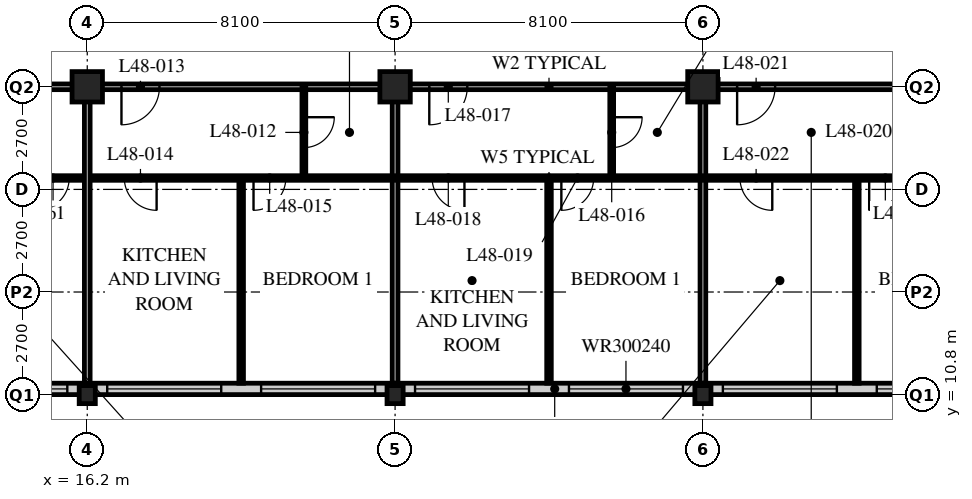
"""IFC4 building model, lengths in metres.
Left out: names, types, materials, properties, quantities, classifications, styles, units other than length and angle.
Written with IfcOpenShell. Run it as: python <this file> out.ifc"""

import sys

from ifc_helpers import new_model, si_unit, direction, frame, frame_2d, origin, origin_2d, place, context, subcontext, project, spatial, rectangle, hollow_rectangle, i_section, extrude, element, fill, save


model = new_model("IFC4")
c1 = context("Model", 3, precision=1e-05, world=origin(), true_north=direction((0.0, 1.0)))
c2 = subcontext(c1, "Body", "Model", "MODEL_VIEW")
j1 = project(units=[si_unit("LENGTHUNIT", "METRE"), si_unit("PLANEANGLEUNIT", "RADIAN")], contexts=[c1])
p1 = place(None, origin())
s1 = spatial("IfcSite", under=j1, at=p1, CompositionType="ELEMENT")
p2 = place(p1, origin())
s2 = spatial("IfcBuilding", under=s1, at=p2, CompositionType="ELEMENT")
p3 = place(p2, frame((0.0, 0.0, 188.4)))
s3 = spatial("IfcBuildingStorey", under=s2, at=p3, CompositionType="ELEMENT", Elevation=188.4)
p4 = place(p3, frame((16.2, 10.8, 0.0), z_axis=(0.0, 0.0, 1.0), x_axis=(1.0, 0.0, 0.0)))
e1 = element("IfcColumn", 1, at=p4, inside=s3, PredefinedType="COLUMN", context=c2, shape_type="SweptSolid", body=[
    extrude(i_section(OverallWidth=0.424, OverallDepth=0.475, WebThickness=0.048, FlangeThickness=0.077, FilletRadius=0.015, at=origin_2d()), origin(), (0.0, 0.0, 1.0), 3.6),
])
p5 = place(p3, frame((16.2, 18.9, 0.0), z_axis=(0.0, 0.0, 1.0), x_axis=(1.0, 0.0, 0.0)))
e2 = element("IfcColumn", 2, at=p5, inside=s3, PredefinedType="COLUMN", context=c2, shape_type="SweptSolid", body=[
    extrude(hollow_rectangle(XDim=0.8, YDim=0.8, WallThickness=0.08, at=origin_2d()), origin(), (0.0, 0.0, 1.0), 3.6),
])
p6 = place(p3, frame((24.3, 10.8, 0.0), z_axis=(0.0, 0.0, 1.0), x_axis=(1.0, 0.0, 0.0)))
e3 = element("IfcColumn", 3, at=p6, inside=s3, PredefinedType="COLUMN", context=c2, shape_type="SweptSolid", body=[
    extrude(i_section(OverallWidth=0.424, OverallDepth=0.475, WebThickness=0.048, FlangeThickness=0.077, FilletRadius=0.015, at=origin_2d()), origin(), (0.0, 0.0, 1.0), 3.6),
])
p7 = place(p3, frame((24.3, 18.9, 0.0), z_axis=(0.0, 0.0, 1.0), x_axis=(1.0, 0.0, 0.0)))
e4 = element("IfcColumn", 4, at=p7, inside=s3, PredefinedType="COLUMN", context=c2, shape_type="SweptSolid", body=[
    extrude(hollow_rectangle(XDim=0.8, YDim=0.8, WallThickness=0.08, at=origin_2d()), origin(), (0.0, 0.0, 1.0), 3.6),
])
p8 = place(p3, frame((32.4, 10.8, 0.0), z_axis=(0.0, 0.0, 1.0), x_axis=(1.0, 0.0, 0.0)))
e5 = element("IfcColumn", 5, at=p8, inside=s3, PredefinedType="COLUMN", context=c2, shape_type="SweptSolid", body=[
    extrude(i_section(OverallWidth=0.424, OverallDepth=0.475, WebThickness=0.048, FlangeThickness=0.077, FilletRadius=0.015, at=origin_2d()), origin(), (0.0, 0.0, 1.0), 3.6),
])
p9 = place(p3, frame((32.4, 18.9, 0.0), z_axis=(0.0, 0.0, 1.0), x_axis=(1.0, 0.0, 0.0)))
e6 = element("IfcColumn", 6, at=p9, inside=s3, PredefinedType="COLUMN", context=c2, shape_type="SweptSolid", body=[
    extrude(hollow_rectangle(XDim=0.8, YDim=0.8, WallThickness=0.08, at=origin_2d()), origin(), (0.0, 0.0, 1.0), 3.6),
])
p10 = place(p3, frame((8.4, 10.95, 0.0), z_axis=(0.0, 0.0, 1.0), x_axis=(1.0, 0.0, 0.0)))
e7 = element("IfcWall", 7, at=p10, inside=s3, PredefinedType="SOLIDWALL", context=c2, shape_type="SweptSolid", body=[
    extrude(rectangle(XDim=40.2, YDim=0.3, at=frame_2d((20.1, 0.0))), origin(), (0.0, 0.0, 1.0), 3.39),
])
p11 = place(p10, frame((0.225, 0.0, 0.6)))
e8 = element("IfcOpeningElement", 8, at=p11, cuts=e7, PredefinedType="OPENING", context=c2, shape_type="SweptSolid", body=[
    extrude(rectangle(XDim=3.0, YDim=2.4, at=frame_2d((1.5, 1.2))), frame((0.0, 0.16, 0.0), z_axis=(0.0, -1.0, 0.0), x_axis=(1.0, 0.0, 0.0)), (0.0, 0.0, 1.0), 0.32),
])
p12 = place(p10, frame((4.275, 0.0, 0.6)))
e9 = element("IfcOpeningElement", 9, at=p12, cuts=e7, PredefinedType="OPENING", context=c2, shape_type="SweptSolid", body=[
    extrude(rectangle(XDim=3.0, YDim=2.4, at=frame_2d((1.5, 1.2))), frame((0.0, 0.16, 0.0), z_axis=(0.0, -1.0, 0.0), x_axis=(1.0, 0.0, 0.0)), (0.0, 0.0, 1.0), 0.32),
])
p13 = place(p10, frame((8.325, 0.0, 0.6)))
e10 = element("IfcOpeningElement", 10, at=p13, cuts=e7, PredefinedType="OPENING", context=c2, shape_type="SweptSolid", body=[
    extrude(rectangle(XDim=3.0, YDim=2.4, at=frame_2d((1.5, 1.2))), frame((0.0, 0.16, 0.0), z_axis=(0.0, -1.0, 0.0), x_axis=(1.0, 0.0, 0.0)), (0.0, 0.0, 1.0), 0.32),
])
p14 = place(p10, frame((12.375, 0.0, 0.6)))
e11 = element("IfcOpeningElement", 11, at=p14, cuts=e7, PredefinedType="OPENING", context=c2, shape_type="SweptSolid", body=[
    extrude(rectangle(XDim=3.0, YDim=2.4, at=frame_2d((1.5, 1.2))), frame((0.0, 0.16, 0.0), z_axis=(0.0, -1.0, 0.0), x_axis=(1.0, 0.0, 0.0)), (0.0, 0.0, 1.0), 0.32),
])
p15 = place(p10, frame((16.425, 0.0, 0.6)))
e12 = element("IfcOpeningElement", 12, at=p15, cuts=e7, PredefinedType="OPENING", context=c2, shape_type="SweptSolid", body=[
    extrude(rectangle(XDim=3.0, YDim=2.4, at=frame_2d((1.5, 1.2))), frame((0.0, 0.16, 0.0), z_axis=(0.0, -1.0, 0.0), x_axis=(1.0, 0.0, 0.0)), (0.0, 0.0, 1.0), 0.32),
])
p16 = place(p10, frame((20.475, 0.0, 0.6)))
e13 = element("IfcOpeningElement", 13, at=p16, cuts=e7, PredefinedType="OPENING", context=c2, shape_type="SweptSolid", body=[
    extrude(rectangle(XDim=3.0, YDim=2.4, at=frame_2d((1.5, 1.2))), frame((0.0, 0.16, 0.0), z_axis=(0.0, -1.0, 0.0), x_axis=(1.0, 0.0, 0.0)), (0.0, 0.0, 1.0), 0.32),
])
p17 = place(p10, frame((24.525, 0.0, 0.6)))
e14 = element("IfcOpeningElement", 14, at=p17, cuts=e7, PredefinedType="OPENING", context=c2, shape_type="SweptSolid", body=[
    extrude(rectangle(XDim=3.0, YDim=2.4, at=frame_2d((1.5, 1.2))), frame((0.0, 0.16, 0.0), z_axis=(0.0, -1.0, 0.0), x_axis=(1.0, 0.0, 0.0)), (0.0, 0.0, 1.0), 0.32),
])
p18 = place(p10, frame((28.575, 0.0, 0.6)))
e15 = element("IfcOpeningElement", 15, at=p18, cuts=e7, PredefinedType="OPENING", context=c2, shape_type="SweptSolid", body=[
    extrude(rectangle(XDim=3.0, YDim=2.4, at=frame_2d((1.5, 1.2))), frame((0.0, 0.16, 0.0), z_axis=(0.0, -1.0, 0.0), x_axis=(1.0, 0.0, 0.0)), (0.0, 0.0, 1.0), 0.32),
])
p19 = place(p10, frame((32.625, 0.0, 0.6)))
e16 = element("IfcOpeningElement", 16, at=p19, cuts=e7, PredefinedType="OPENING", context=c2, shape_type="SweptSolid", body=[
    extrude(rectangle(XDim=3.0, YDim=2.4, at=frame_2d((1.5, 1.2))), frame((0.0, 0.16, 0.0), z_axis=(0.0, -1.0, 0.0), x_axis=(1.0, 0.0, 0.0)), (0.0, 0.0, 1.0), 0.32),
])
p20 = place(p10, frame((36.675, 0.0, 0.6)))
e17 = element("IfcOpeningElement", 17, at=p20, cuts=e7, PredefinedType="OPENING", context=c2, shape_type="SweptSolid", body=[
    extrude(rectangle(XDim=3.0, YDim=2.4, at=frame_2d((1.5, 1.2))), frame((0.0, 0.16, 0.0), z_axis=(0.0, -1.0, 0.0), x_axis=(1.0, 0.0, 0.0)), (0.0, 0.0, 1.0), 0.32),
])
p21 = place(p3, frame((12.15, 18.9, 0.0), z_axis=(0.0, 0.0, 1.0), x_axis=(1.0, 0.0, 0.0)))
e18 = element("IfcWall", 18, at=p21, inside=s3, PredefinedType="PARTITIONING", context=c2, shape_type="SweptSolid", body=[
    extrude(rectangle(XDim=32.4, YDim=0.15, at=frame_2d((16.2, 0.0))), origin(), (0.0, 0.0, 1.0), 2.778),
])
p22 = place(p21, frame((4.95, 0.0, 0.0)))
e19 = element("IfcOpeningElement", 19, at=p22, cuts=e18, PredefinedType="OPENING", context=c2, shape_type="SweptSolid", body=[
    extrude(rectangle(XDim=1.0, YDim=2.1, at=frame_2d((0.5, 1.05))), frame((0.0, 0.085, 0.0), z_axis=(0.0, -1.0, 0.0), x_axis=(1.0, 0.0, 0.0)), (0.0, 0.0, 1.0), 0.17),
])
p23 = place(p21, frame((13.05, 0.0, 0.0)))
e20 = element("IfcOpeningElement", 20, at=p23, cuts=e18, PredefinedType="OPENING", context=c2, shape_type="SweptSolid", body=[
    extrude(rectangle(XDim=1.0, YDim=2.1, at=frame_2d((0.5, 1.05))), frame((0.0, 0.085, 0.0), z_axis=(0.0, -1.0, 0.0), x_axis=(1.0, 0.0, 0.0)), (0.0, 0.0, 1.0), 0.17),
])
p24 = place(p21, frame((21.15, 0.0, 0.0)))
e21 = element("IfcOpeningElement", 21, at=p24, cuts=e18, PredefinedType="OPENING", context=c2, shape_type="SweptSolid", body=[
    extrude(rectangle(XDim=1.0, YDim=2.1, at=frame_2d((0.5, 1.05))), frame((0.0, 0.085, 0.0), z_axis=(0.0, -1.0, 0.0), x_axis=(1.0, 0.0, 0.0)), (0.0, 0.0, 1.0), 0.17),
])
p25 = place(p21, frame((1.525, 0.0, 0.0)))
e22 = element("IfcOpeningElement", 22, at=p25, cuts=e18, PredefinedType="OPENING", context=c2, shape_type="SweptSolid", body=[
    extrude(rectangle(XDim=1.0, YDim=2.1, at=frame_2d((0.5, 1.05))), frame((0.0, 0.085, 0.0), z_axis=(0.0, -1.0, 0.0), x_axis=(1.0, 0.0, 0.0)), (0.0, 0.0, 1.0), 0.17),
])
p26 = place(p21, frame((29.875, 0.0, 0.0)))
e23 = element("IfcOpeningElement", 23, at=p26, cuts=e18, PredefinedType="OPENING", context=c2, shape_type="SweptSolid", body=[
    extrude(rectangle(XDim=1.0, YDim=2.1, at=frame_2d((0.5, 1.05))), frame((0.0, 0.085, 0.0), z_axis=(0.0, -1.0, 0.0), x_axis=(1.0, 0.0, 0.0)), (0.0, 0.0, 1.0), 0.17),
])
p27 = place(p3, frame((21.9, 18.9, 0.0), z_axis=(0.0, 0.0, 1.0), x_axis=(0.0, -1.0, 0.0)))
e24 = element("IfcWall", 24, at=p27, inside=s3, PredefinedType="PARTITIONING", context=c2, shape_type="SweptSolid", body=[
    extrude(rectangle(XDim=2.4, YDim=0.1, at=frame_2d((1.2, 0.0))), origin(), (0.0, 0.0, 1.0), 3.39),
])
p28 = place(p27, frame((0.8, 0.0, 0.0)))
e25 = element("IfcOpeningElement", 25, at=p28, cuts=e24, PredefinedType="OPENING", context=c2, shape_type="SweptSolid", body=[
    extrude(rectangle(XDim=0.8, YDim=2.1, at=frame_2d((0.4, 1.05))), frame((0.0, 0.06, 0.0), z_axis=(0.0, -1.0, 0.0), x_axis=(1.0, 0.0, 0.0)), (0.0, 0.0, 1.0), 0.12),
])
p29 = place(p3, frame((20.25, 16.5, 0.0), z_axis=(0.0, 0.0, 1.0), x_axis=(0.0, -1.0, 0.0)))
e26 = element("IfcWall", 26, at=p29, inside=s3, PredefinedType="PARTITIONING", context=c2, shape_type="SweptSolid", body=[
    extrude(rectangle(XDim=5.4, YDim=0.12, at=frame_2d((2.7, 0.0))), origin(), (0.0, 0.0, 1.0), 3.39),
])
p30 = place(p3, frame((24.3, 18.9, 0.0), z_axis=(0.0, 0.0, 1.0), x_axis=(0.0, -1.0, 0.0)))
e27 = element("IfcWall", 27, at=p30, inside=s3, PredefinedType="PARTITIONING", context=c2, shape_type="SweptSolid", body=[
    extrude(rectangle(XDim=7.8, YDim=0.15, at=frame_2d((3.9, 0.0))), origin(), (0.0, 0.0, 1.0), 2.778),
])
p31 = place(p3, frame((30.0, 18.9, 0.0), z_axis=(0.0, 0.0, 1.0), x_axis=(0.0, -1.0, 0.0)))
e28 = element("IfcWall", 28, at=p31, inside=s3, PredefinedType="PARTITIONING", context=c2, shape_type="SweptSolid", body=[
    extrude(rectangle(XDim=2.4, YDim=0.1, at=frame_2d((1.2, 0.0))), origin(), (0.0, 0.0, 1.0), 3.39),
])
p32 = place(p31, frame((0.8, 0.0, 0.0)))
e29 = element("IfcOpeningElement", 29, at=p32, cuts=e28, PredefinedType="OPENING", context=c2, shape_type="SweptSolid", body=[
    extrude(rectangle(XDim=0.8, YDim=2.1, at=frame_2d((0.4, 1.05))), frame((0.0, 0.06, 0.0), z_axis=(0.0, -1.0, 0.0), x_axis=(1.0, 0.0, 0.0)), (0.0, 0.0, 1.0), 0.12),
])
p33 = place(p3, frame((28.35, 16.5, 0.0), z_axis=(0.0, 0.0, 1.0), x_axis=(0.0, -1.0, 0.0)))
e30 = element("IfcWall", 30, at=p33, inside=s3, PredefinedType="PARTITIONING", context=c2, shape_type="SweptSolid", body=[
    extrude(rectangle(XDim=5.4, YDim=0.12, at=frame_2d((2.7, 0.0))), origin(), (0.0, 0.0, 1.0), 3.39),
])
p34 = place(p3, frame((32.4, 18.9, 0.0), z_axis=(0.0, 0.0, 1.0), x_axis=(0.0, -1.0, 0.0)))
e31 = element("IfcWall", 31, at=p34, inside=s3, PredefinedType="PARTITIONING", context=c2, shape_type="SweptSolid", body=[
    extrude(rectangle(XDim=7.8, YDim=0.15, at=frame_2d((3.9, 0.0))), origin(), (0.0, 0.0, 1.0), 2.778),
])
p35 = place(p3, frame((36.45, 16.5, 0.0), z_axis=(0.0, 0.0, 1.0), x_axis=(0.0, -1.0, 0.0)))
e32 = element("IfcWall", 32, at=p35, inside=s3, PredefinedType="PARTITIONING", context=c2, shape_type="SweptSolid", body=[
    extrude(rectangle(XDim=5.4, YDim=0.12, at=frame_2d((2.7, 0.0))), origin(), (0.0, 0.0, 1.0), 3.39),
])
p36 = place(p3, frame((8.15, 16.5, 0.0), z_axis=(0.0, 0.0, 1.0), x_axis=(1.0, 0.0, 0.0)))
e33 = element("IfcWall", 33, at=p36, inside=s3, PredefinedType="PARTITIONING", context=c2, shape_type="SweptSolid", body=[
    extrude(rectangle(XDim=40.4, YDim=0.12, at=frame_2d((20.2, 0.0))), origin(), (0.0, 0.0, 1.0), 3.39),
])
p37 = place(p36, frame((9.025, 0.0, 0.0)))
e34 = element("IfcOpeningElement", 34, at=p37, cuts=e33, PredefinedType="OPENING", context=c2, shape_type="SweptSolid", body=[
    extrude(rectangle(XDim=0.85, YDim=2.1, at=frame_2d((0.425, 1.05))), frame((0.0, 0.07, 0.0), z_axis=(0.0, -1.0, 0.0), x_axis=(1.0, 0.0, 0.0)), (0.0, 0.0, 1.0), 0.14),
])
p38 = place(p36, frame((12.425, 0.0, 0.0)))
e35 = element("IfcOpeningElement", 35, at=p38, cuts=e33, PredefinedType="OPENING", context=c2, shape_type="SweptSolid", body=[
    extrude(rectangle(XDim=0.85, YDim=2.1, at=frame_2d((0.425, 1.05))), frame((0.0, 0.07, 0.0), z_axis=(0.0, -1.0, 0.0), x_axis=(1.0, 0.0, 0.0)), (0.0, 0.0, 1.0), 0.14),
])
p39 = place(p36, frame((17.125, 0.0, 0.0)))
e36 = element("IfcOpeningElement", 36, at=p39, cuts=e33, PredefinedType="OPENING", context=c2, shape_type="SweptSolid", body=[
    extrude(rectangle(XDim=0.85, YDim=2.1, at=frame_2d((0.425, 1.05))), frame((0.0, 0.07, 0.0), z_axis=(0.0, -1.0, 0.0), x_axis=(1.0, 0.0, 0.0)), (0.0, 0.0, 1.0), 0.14),
])
p40 = place(p36, frame((20.525, 0.0, 0.0)))
e37 = element("IfcOpeningElement", 37, at=p40, cuts=e33, PredefinedType="OPENING", context=c2, shape_type="SweptSolid", body=[
    extrude(rectangle(XDim=0.85, YDim=2.1, at=frame_2d((0.425, 1.05))), frame((0.0, 0.07, 0.0), z_axis=(0.0, -1.0, 0.0), x_axis=(1.0, 0.0, 0.0)), (0.0, 0.0, 1.0), 0.14),
])
p41 = place(p36, frame((25.225, 0.0, 0.0)))
e38 = element("IfcOpeningElement", 38, at=p41, cuts=e33, PredefinedType="OPENING", context=c2, shape_type="SweptSolid", body=[
    extrude(rectangle(XDim=0.85, YDim=2.1, at=frame_2d((0.425, 1.05))), frame((0.0, 0.07, 0.0), z_axis=(0.0, -1.0, 0.0), x_axis=(1.0, 0.0, 0.0)), (0.0, 0.0, 1.0), 0.14),
])
p42 = place(p36, frame((28.625, 0.0, 0.0)))
e39 = element("IfcOpeningElement", 39, at=p42, cuts=e33, PredefinedType="OPENING", context=c2, shape_type="SweptSolid", body=[
    extrude(rectangle(XDim=0.85, YDim=2.1, at=frame_2d((0.425, 1.05))), frame((0.0, 0.07, 0.0), z_axis=(0.0, -1.0, 0.0), x_axis=(1.0, 0.0, 0.0)), (0.0, 0.0, 1.0), 0.14),
])
p43 = place(p36, frame((6.725, 0.0, 0.0)))
e40 = element("IfcOpeningElement", 40, at=p43, cuts=e33, PredefinedType="OPENING", context=c2, shape_type="SweptSolid", body=[
    extrude(rectangle(XDim=0.85, YDim=2.1, at=frame_2d((0.425, 1.05))), frame((0.0, 0.07, 0.0), z_axis=(0.0, -1.0, 0.0), x_axis=(1.0, 0.0, 0.0)), (0.0, 0.0, 1.0), 0.14),
])
p44 = place(p36, frame((2.875, 0.0, 0.0)))
e41 = element("IfcOpeningElement", 41, at=p44, cuts=e33, PredefinedType="OPENING", context=c2, shape_type="SweptSolid", body=[
    extrude(rectangle(XDim=0.85, YDim=2.1, at=frame_2d((0.425, 1.05))), frame((0.0, 0.07, 0.0), z_axis=(0.0, -1.0, 0.0), x_axis=(1.0, 0.0, 0.0)), (0.0, 0.0, 1.0), 0.14),
])
p45 = place(p36, frame((32.825, 0.0, 0.0)))
e42 = element("IfcOpeningElement", 42, at=p45, cuts=e33, PredefinedType="OPENING", context=c2, shape_type="SweptSolid", body=[
    extrude(rectangle(XDim=0.85, YDim=2.1, at=frame_2d((0.425, 1.05))), frame((0.0, 0.07, 0.0), z_axis=(0.0, -1.0, 0.0), x_axis=(1.0, 0.0, 0.0)), (0.0, 0.0, 1.0), 0.14),
])
p46 = place(p36, frame((36.675, 0.0, 0.0)))
e43 = element("IfcOpeningElement", 43, at=p46, cuts=e33, PredefinedType="OPENING", context=c2, shape_type="SweptSolid", body=[
    extrude(rectangle(XDim=0.85, YDim=2.1, at=frame_2d((0.425, 1.05))), frame((0.0, 0.07, 0.0), z_axis=(0.0, -1.0, 0.0), x_axis=(1.0, 0.0, 0.0)), (0.0, 0.0, 1.0), 0.14),
])
p47 = place(p3, frame((16.2, 18.9, 0.0), z_axis=(0.0, 0.0, 1.0), x_axis=(0.0, -1.0, 0.0)))
e44 = element("IfcWall", 44, at=p47, inside=s3, PredefinedType="PARTITIONING", context=c2, shape_type="SweptSolid", body=[
    extrude(rectangle(XDim=7.8, YDim=0.15, at=frame_2d((3.9, 0.0))), origin(), (0.0, 0.0, 1.0), 2.778),
])
p48 = place(p12, origin())
e45 = element("IfcWindow", 45, at=p48, inside=s3, PartitioningType="SINGLE_PANEL", PredefinedType="WINDOW", context=c2, shape_type="SweptSolid", body=[
    extrude(rectangle(XDim=3.0, YDim=2.4, at=frame_2d((1.5, 1.2))), frame((0.0, 0.03, 0.0), z_axis=(0.0, -1.0, 0.0), x_axis=(1.0, 0.0, 0.0)), (0.0, 0.0, 1.0), 0.06),
])
fill(e9, e45)
p49 = place(p13, origin())
e46 = element("IfcWindow", 46, at=p49, inside=s3, PartitioningType="SINGLE_PANEL", PredefinedType="WINDOW", context=c2, shape_type="SweptSolid", body=[
    extrude(rectangle(XDim=3.0, YDim=2.4, at=frame_2d((1.5, 1.2))), frame((0.0, 0.03, 0.0), z_axis=(0.0, -1.0, 0.0), x_axis=(1.0, 0.0, 0.0)), (0.0, 0.0, 1.0), 0.06),
])
fill(e10, e46)
p50 = place(p14, origin())
e47 = element("IfcWindow", 47, at=p50, inside=s3, PartitioningType="SINGLE_PANEL", PredefinedType="WINDOW", context=c2, shape_type="SweptSolid", body=[
    extrude(rectangle(XDim=3.0, YDim=2.4, at=frame_2d((1.5, 1.2))), frame((0.0, 0.03, 0.0), z_axis=(0.0, -1.0, 0.0), x_axis=(1.0, 0.0, 0.0)), (0.0, 0.0, 1.0), 0.06),
])
fill(e11, e47)
p51 = place(p15, origin())
e48 = element("IfcWindow", 48, at=p51, inside=s3, PartitioningType="SINGLE_PANEL", PredefinedType="WINDOW", context=c2, shape_type="SweptSolid", body=[
    extrude(rectangle(XDim=3.0, YDim=2.4, at=frame_2d((1.5, 1.2))), frame((0.0, 0.03, 0.0), z_axis=(0.0, -1.0, 0.0), x_axis=(1.0, 0.0, 0.0)), (0.0, 0.0, 1.0), 0.06),
])
fill(e12, e48)
p52 = place(p16, origin())
e49 = element("IfcWindow", 49, at=p52, inside=s3, PartitioningType="SINGLE_PANEL", PredefinedType="WINDOW", context=c2, shape_type="SweptSolid", body=[
    extrude(rectangle(XDim=3.0, YDim=2.4, at=frame_2d((1.5, 1.2))), frame((0.0, 0.03, 0.0), z_axis=(0.0, -1.0, 0.0), x_axis=(1.0, 0.0, 0.0)), (0.0, 0.0, 1.0), 0.06),
])
fill(e13, e49)
p53 = place(p17, origin())
e50 = element("IfcWindow", 50, at=p53, inside=s3, PartitioningType="SINGLE_PANEL", PredefinedType="WINDOW", context=c2, shape_type="SweptSolid", body=[
    extrude(rectangle(XDim=3.0, YDim=2.4, at=frame_2d((1.5, 1.2))), frame((0.0, 0.03, 0.0), z_axis=(0.0, -1.0, 0.0), x_axis=(1.0, 0.0, 0.0)), (0.0, 0.0, 1.0), 0.06),
])
fill(e14, e50)
p54 = place(p18, origin())
e51 = element("IfcWindow", 51, at=p54, inside=s3, PartitioningType="SINGLE_PANEL", PredefinedType="WINDOW", context=c2, shape_type="SweptSolid", body=[
    extrude(rectangle(XDim=3.0, YDim=2.4, at=frame_2d((1.5, 1.2))), frame((0.0, 0.03, 0.0), z_axis=(0.0, -1.0, 0.0), x_axis=(1.0, 0.0, 0.0)), (0.0, 0.0, 1.0), 0.06),
])
fill(e15, e51)
p55 = place(p28, origin())
e52 = element("IfcDoor", 52, at=p55, inside=s3, OperationType="SINGLE_SWING_LEFT", PredefinedType="DOOR", context=c2, shape_type="SweptSolid", body=[
    extrude(rectangle(XDim=0.8, YDim=2.1, at=frame_2d((0.4, 1.05))), frame((0.0, 0.025, 0.0), z_axis=(0.0, -1.0, 0.0), x_axis=(1.0, 0.0, 0.0)), (0.0, 0.0, 1.0), 0.05),
])
fill(e25, e52)
p56 = place(p22, origin())
e53 = element("IfcDoor", 53, at=p56, inside=s3, OperationType="SINGLE_SWING_RIGHT", PredefinedType="DOOR", context=c2, shape_type="SweptSolid", body=[
    extrude(rectangle(XDim=1.0, YDim=2.1, at=frame_2d((0.5, 1.05))), frame((0.0, 0.025, 0.0), z_axis=(0.0, -1.0, 0.0), x_axis=(1.0, 0.0, 0.0)), (0.0, 0.0, 1.0), 0.05),
])
fill(e19, e53)
p57 = place(p37, origin())
e54 = element("IfcDoor", 54, at=p57, inside=s3, OperationType="SINGLE_SWING_LEFT", PredefinedType="DOOR", context=c2, shape_type="SweptSolid", body=[
    extrude(rectangle(XDim=0.85, YDim=2.1, at=frame_2d((0.425, 1.05))), frame((0.0, 0.025, 0.0), z_axis=(0.0, -1.0, 0.0), x_axis=(1.0, 0.0, 0.0)), (0.0, 0.0, 1.0), 0.05),
])
fill(e34, e54)
p58 = place(p38, origin())
e55 = element("IfcDoor", 55, at=p58, inside=s3, OperationType="SINGLE_SWING_RIGHT", PredefinedType="DOOR", context=c2, shape_type="SweptSolid", body=[
    extrude(rectangle(XDim=0.85, YDim=2.1, at=frame_2d((0.425, 1.05))), frame((0.0, 0.025, 0.0), z_axis=(0.0, -1.0, 0.0), x_axis=(1.0, 0.0, 0.0)), (0.0, 0.0, 1.0), 0.05),
])
fill(e35, e55)
p59 = place(p32, origin())
e56 = element("IfcDoor", 56, at=p59, inside=s3, OperationType="SINGLE_SWING_LEFT", PredefinedType="DOOR", context=c2, shape_type="SweptSolid", body=[
    extrude(rectangle(XDim=0.8, YDim=2.1, at=frame_2d((0.4, 1.05))), frame((0.0, 0.025, 0.0), z_axis=(0.0, -1.0, 0.0), x_axis=(1.0, 0.0, 0.0)), (0.0, 0.0, 1.0), 0.05),
])
fill(e29, e56)
p60 = place(p23, origin())
e57 = element("IfcDoor", 57, at=p60, inside=s3, OperationType="SINGLE_SWING_RIGHT", PredefinedType="DOOR", context=c2, shape_type="SweptSolid", body=[
    extrude(rectangle(XDim=1.0, YDim=2.1, at=frame_2d((0.5, 1.05))), frame((0.0, 0.025, 0.0), z_axis=(0.0, -1.0, 0.0), x_axis=(1.0, 0.0, 0.0)), (0.0, 0.0, 1.0), 0.05),
])
fill(e20, e57)
p61 = place(p39, origin())
e58 = element("IfcDoor", 58, at=p61, inside=s3, OperationType="SINGLE_SWING_LEFT", PredefinedType="DOOR", context=c2, shape_type="SweptSolid", body=[
    extrude(rectangle(XDim=0.85, YDim=2.1, at=frame_2d((0.425, 1.05))), frame((0.0, 0.025, 0.0), z_axis=(0.0, -1.0, 0.0), x_axis=(1.0, 0.0, 0.0)), (0.0, 0.0, 1.0), 0.05),
])
fill(e36, e58)
p62 = place(p40, origin())
e59 = element("IfcDoor", 59, at=p62, inside=s3, OperationType="SINGLE_SWING_RIGHT", PredefinedType="DOOR", context=c2, shape_type="SweptSolid", body=[
    extrude(rectangle(XDim=0.85, YDim=2.1, at=frame_2d((0.425, 1.05))), frame((0.0, 0.025, 0.0), z_axis=(0.0, -1.0, 0.0), x_axis=(1.0, 0.0, 0.0)), (0.0, 0.0, 1.0), 0.05),
])
fill(e37, e59)
p63 = place(p24, origin())
e60 = element("IfcDoor", 60, at=p63, inside=s3, OperationType="SINGLE_SWING_RIGHT", PredefinedType="DOOR", context=c2, shape_type="SweptSolid", body=[
    extrude(rectangle(XDim=1.0, YDim=2.1, at=frame_2d((0.5, 1.05))), frame((0.0, 0.025, 0.0), z_axis=(0.0, -1.0, 0.0), x_axis=(1.0, 0.0, 0.0)), (0.0, 0.0, 1.0), 0.05),
])
fill(e21, e60)
p64 = place(p41, origin())
e61 = element("IfcDoor", 61, at=p64, inside=s3, OperationType="SINGLE_SWING_LEFT", PredefinedType="DOOR", context=c2, shape_type="SweptSolid", body=[
    extrude(rectangle(XDim=0.85, YDim=2.1, at=frame_2d((0.425, 1.05))), frame((0.0, 0.025, 0.0), z_axis=(0.0, -1.0, 0.0), x_axis=(1.0, 0.0, 0.0)), (0.0, 0.0, 1.0), 0.05),
])
fill(e38, e61)
p65 = place(p42, origin())
e62 = element("IfcDoor", 62, at=p65, inside=s3, OperationType="SINGLE_SWING_RIGHT", PredefinedType="DOOR", context=c2, shape_type="SweptSolid", body=[
    extrude(rectangle(XDim=0.85, YDim=2.1, at=frame_2d((0.425, 1.05))), frame((0.0, 0.025, 0.0), z_axis=(0.0, -1.0, 0.0), x_axis=(1.0, 0.0, 0.0)), (0.0, 0.0, 1.0), 0.05),
])
fill(e39, e62)
p66 = place(p43, origin())
e63 = element("IfcDoor", 63, at=p66, inside=s3, OperationType="SINGLE_SWING_RIGHT", PredefinedType="DOOR", context=c2, shape_type="SweptSolid", body=[
    extrude(rectangle(XDim=0.85, YDim=2.1, at=frame_2d((0.425, 1.05))), frame((0.0, 0.025, 0.0), z_axis=(0.0, -1.0, 0.0), x_axis=(1.0, 0.0, 0.0)), (0.0, 0.0, 1.0), 0.05),
])
fill(e40, e63)
save(model, sys.argv[1])
